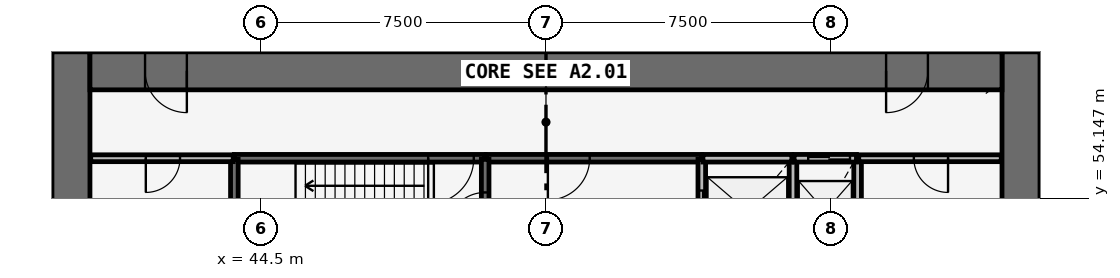
"""IFC4 building model, lengths in metres.
Left out: names, types, materials, properties, quantities, classifications, styles, units other than length and angle.
Written with IfcOpenShell. Run it as: python <this file> out.ifc"""

import sys

from ifc_helpers import new_model, si_unit, direction, frame, frame_2d, origin, place, context, subcontext, project, spatial, rectangle, extrude, source, transform, mapped, element, fill, save


model = new_model("IFC4")
c1 = context("Model", 3, precision=1e-05, world=origin(), true_north=direction((0.0, 1.0)))
c2 = subcontext(c1, "Body", "Model", "MODEL_VIEW")
j1 = project(units=[si_unit("LENGTHUNIT", "METRE"), si_unit("PLANEANGLEUNIT", "RADIAN")], contexts=[c1])
p1 = place(None, origin())
s1 = spatial("IfcSite", under=j1, at=p1, CompositionType="ELEMENT")
p2 = place(p1, origin())
s2 = spatial("IfcBuilding", under=s1, at=p2, CompositionType="ELEMENT")
p3 = place(p2, origin())
s3 = spatial("IfcBuildingStorey", under=s2, at=p3, CompositionType="ELEMENT", Elevation=0.0)
p4 = place(p3, frame((64.5, 38.0, -0.35), z_axis=(0.0, 0.0, 1.0), x_axis=(0.0, 1.0, 0.0)))
e1 = element("IfcWall", 1, at=p4, inside=s3, PredefinedType="SHEAR", context=c2, shape_type="SweptSolid", body=[
    extrude(rectangle(XDim=20.0, YDim=1.0, at=frame_2d((10.0, 0.0))), origin(), (0.0, 0.0, 1.0), 5.35),
])
p5 = place(p4, frame((9.1, 0.0, 0.35)))
e2 = element("IfcOpeningElement", 2, at=p5, cuts=e1, PredefinedType="OPENING", context=c2, shape_type="SweptSolid", body=[
    extrude(rectangle(XDim=1.8, YDim=2.1, at=frame_2d((0.9, 1.05))), frame((0.0, 0.51, 0.0), z_axis=(0.0, -1.0, 0.0), x_axis=(1.0, 0.0, 0.0)), (0.0, 0.0, 1.0), 1.02),
])
p6 = place(p3, frame((39.5, 58.0, -0.35), z_axis=(0.0, 0.0, 1.0), x_axis=(0.0, -1.0, 0.0)))
e3 = element("IfcWall", 3, at=p6, inside=s3, PredefinedType="SHEAR", context=c2, shape_type="SweptSolid", body=[
    extrude(rectangle(XDim=20.0, YDim=1.0, at=frame_2d((10.0, 0.0))), origin(), (0.0, 0.0, 1.0), 5.35),
])
p7 = place(p6, frame((9.1, 0.0, 0.35)))
e4 = element("IfcOpeningElement", 4, at=p7, cuts=e3, PredefinedType="OPENING", context=c2, shape_type="SweptSolid", body=[
    extrude(rectangle(XDim=1.8, YDim=2.1, at=frame_2d((0.9, 1.05))), frame((0.0, 0.51, 0.0), z_axis=(0.0, -1.0, 0.0), x_axis=(1.0, 0.0, 0.0)), (0.0, 0.0, 1.0), 1.02),
])
p8 = place(p3, frame((64.0, 57.5, -0.35), z_axis=(0.0, 0.0, 1.0), x_axis=(-1.0, 0.0, 0.0)))
e5 = element("IfcWall", 5, at=p8, inside=s3, PredefinedType="SHEAR", context=c2, shape_type="SweptSolid", body=[
    extrude(rectangle(XDim=24.0, YDim=1.0, at=frame_2d((12.0, 0.0))), origin(), (0.0, 0.0, 1.0), 5.35),
])
p9 = place(p8, frame((21.45, 0.0, 0.35)))
e6 = element("IfcOpeningElement", 6, at=p9, cuts=e5, PredefinedType="OPENING", context=c2, shape_type="SweptSolid", body=[
    extrude(rectangle(XDim=1.1, YDim=2.1, at=frame_2d((0.55, 1.05))), frame((0.0, 0.51, 0.0), z_axis=(0.0, -1.0, 0.0), x_axis=(1.0, 0.0, 0.0)), (0.0, 0.0, 1.0), 1.02),
])
p10 = place(p8, frame((1.95, 0.0, 0.35)))
e7 = element("IfcOpeningElement", 7, at=p10, cuts=e5, PredefinedType="OPENING", context=c2, shape_type="SweptSolid", body=[
    extrude(rectangle(XDim=1.1, YDim=2.1, at=frame_2d((0.55, 1.05))), frame((0.0, 0.51, 0.0), z_axis=(0.0, -1.0, 0.0), x_axis=(1.0, 0.0, 0.0)), (0.0, 0.0, 1.0), 1.02),
])
p11 = place(p3, frame((50.4, 55.2, 0.0), z_axis=(0.0, 0.0, 1.0), x_axis=(-1.0, 0.0, 0.0)))
e8 = element("IfcWall", 8, at=p11, inside=s3, PredefinedType="SOLIDWALL", context=c2, shape_type="SweptSolid", body=[
    extrude(rectangle(XDim=6.6, YDim=0.2, at=frame_2d((3.3, 0.0))), origin(), (0.0, 0.0, 1.0), 4.65),
])
p12 = place(p11, frame((0.3, 0.0, 0.0)))
e9 = element("IfcOpeningElement", 9, at=p12, cuts=e8, PredefinedType="OPENING", context=c2, shape_type="SweptSolid", body=[
    extrude(rectangle(XDim=1.2, YDim=2.1, at=frame_2d((0.6, 1.05))), frame((0.0, 0.11, 0.0), z_axis=(0.0, -1.0, 0.0), x_axis=(1.0, 0.0, 0.0)), (0.0, 0.0, 1.0), 0.22),
])
p13 = place(p3, frame((56.1, 55.2, 0.0), z_axis=(0.0, 0.0, 1.0), x_axis=(-1.0, 0.0, 0.0)))
e10 = element("IfcWall", 10, at=p13, inside=s3, PredefinedType="SOLIDWALL", context=c2, shape_type="SweptSolid", body=[
    extrude(rectangle(XDim=5.67, YDim=0.2, at=frame_2d((2.835, 0.0))), origin(), (0.0, 0.0, 1.0), 4.65),
])
p14 = place(p13, frame((2.95, 0.0, 0.0)))
e11 = element("IfcOpeningElement", 11, at=p14, cuts=e10, PredefinedType="OPENING", context=c2, shape_type="SweptSolid", body=[
    extrude(rectangle(XDim=1.1, YDim=2.1, at=frame_2d((0.55, 1.05))), frame((0.0, 0.11, 0.0), z_axis=(0.0, -1.0, 0.0), x_axis=(1.0, 0.0, 0.0)), (0.0, 0.0, 1.0), 0.22),
])
p15 = place(p3, frame((50.4, 52.4, 0.0), z_axis=(0.0, 0.0, 1.0), x_axis=(0.0, 1.0, 0.0)))
e12 = element("IfcWall", 12, at=p15, inside=s3, PredefinedType="SOLIDWALL", context=c2, shape_type="SweptSolid", body=[
    extrude(rectangle(XDim=2.77, YDim=0.2, at=frame_2d((1.385, 0.0))), origin(), (0.0, 0.0, 1.0), 4.65),
])
p16 = place(p15, frame((0.9, 0.0, 0.0)))
e13 = element("IfcOpeningElement", 13, at=p16, cuts=e12, PredefinedType="OPENING", context=c2, shape_type="SweptSolid", body=[
    extrude(rectangle(XDim=1.0, YDim=2.1, at=frame_2d((0.5, 1.05))), frame((0.0, 0.11, 0.0), z_axis=(0.0, -1.0, 0.0), x_axis=(1.0, 0.0, 0.0)), (0.0, 0.0, 1.0), 0.22),
])
p17 = place(p3, frame((56.1, 55.17, 0.0), z_axis=(0.0, 0.0, 1.0), x_axis=(0.0, -1.0, 0.0)))
e14 = element("IfcWall", 14, at=p17, inside=s3, PredefinedType="SOLIDWALL", context=c2, shape_type="SweptSolid", body=[
    extrude(rectangle(XDim=2.77, YDim=0.2, at=frame_2d((1.385, 0.0))), origin(), (0.0, 0.0, 1.0), 4.65),
])
p18 = place(p17, frame((0.82, 0.0, 0.0)))
e15 = element("IfcOpeningElement", 15, at=p18, cuts=e14, PredefinedType="OPENING", context=c2, shape_type="SweptSolid", body=[
    extrude(rectangle(XDim=1.1, YDim=2.1, at=frame_2d((0.55, 1.05))), frame((0.0, 0.11, 0.0), z_axis=(0.0, -1.0, 0.0), x_axis=(1.0, 0.0, 0.0)), (0.0, 0.0, 1.0), 0.22),
])
for number, where, z_axis, x_axis in (
    (16, (58.5, 52.4, 0.0), (0.0, 0.0, 1.0), (0.0, 1.0, 0.0)),
    (17, (60.2, 52.4, 0.0), (0.0, 0.0, 1.0), (0.0, 1.0, 0.0)),
):
    element("IfcWall", number, at=place(p3, frame(where, z_axis=z_axis, x_axis=x_axis)), inside=s3, PredefinedType="SOLIDWALL", context=c2, shape_type="SweptSolid", body=[
        extrude(rectangle(XDim=2.8, YDim=0.2, at=frame_2d((1.4, 0.0))), origin(), (0.0, 0.0, 1.0), 4.65),
    ])
p19 = place(p3, frame((58.47, 55.2, 0.0), z_axis=(0.0, 0.0, 1.0), x_axis=(-1.0, 0.0, 0.0)))
e18 = element("IfcWall", 18, at=p19, inside=s3, PredefinedType="SOLIDWALL", context=c2, shape_type="SweptSolid", body=[
    extrude(rectangle(XDim=2.34, YDim=0.2, at=frame_2d((1.17, 0.0))), origin(), (0.0, 0.0, 1.0), 4.65),
])
p20 = place(p3, frame((43.8, 55.17, 0.0), z_axis=(0.0, 0.0, 1.0), x_axis=(0.0, -1.0, 0.0)))
e19 = element("IfcWall", 19, at=p20, inside=s3, PredefinedType="SOLIDWALL", context=c2, shape_type="SweptSolid", body=[
    extrude(rectangle(XDim=2.14, YDim=0.2, at=frame_2d((1.07, 0.0))), origin(), (0.0, 0.0, 1.0), 4.65),
])
p21 = place(p3, frame((60.17, 55.2, 0.0), z_axis=(0.0, 0.0, 1.0), x_axis=(-1.0, 0.0, 0.0)))
e20 = element("IfcWall", 20, at=p21, inside=s3, PredefinedType="SOLIDWALL", context=c2, shape_type="SweptSolid", body=[
    extrude(rectangle(XDim=1.64, YDim=0.2, at=frame_2d((0.82, 0.0))), origin(), (0.0, 0.0, 1.0), 4.65),
])
p22 = place(p21, frame((0.17, 0.0, 0.0)))
e21 = element("IfcOpeningElement", 21, at=p22, cuts=e20, PredefinedType="OPENING", context=c2, shape_type="SweptSolid", body=[
    extrude(rectangle(XDim=1.1, YDim=2.1, at=frame_2d((0.55, 1.05))), frame((0.0, 0.11, 0.0), z_axis=(0.0, -1.0, 0.0), x_axis=(1.0, 0.0, 0.0)), (0.0, 0.0, 1.0), 0.22),
])
p23 = place(p3, frame((43.77, 55.2, 0.0), z_axis=(0.0, 0.0, 1.0), x_axis=(-1.0, 0.0, 0.0)))
e22 = element("IfcWall", 22, at=p23, inside=s3, PredefinedType="PARTITIONING", context=c2, shape_type="SweptSolid", body=[
    extrude(rectangle(XDim=3.75, YDim=0.18, at=frame_2d((1.875, 0.0))), origin(), (0.0, 0.0, 1.0), 4.65),
])
p24 = place(p23, frame((1.4, 0.0, 0.0)))
e23 = element("IfcOpeningElement", 23, at=p24, cuts=e22, PredefinedType="OPENING", context=c2, shape_type="SweptSolid", body=[
    extrude(rectangle(XDim=0.9, YDim=2.1, at=frame_2d((0.45, 1.05))), frame((0.0, 0.1, 0.0), z_axis=(0.0, -1.0, 0.0), x_axis=(1.0, 0.0, 0.0)), (0.0, 0.0, 1.0), 0.2),
])
p25 = place(p3, frame((63.98, 55.2, 0.0), z_axis=(0.0, 0.0, 1.0), x_axis=(-1.0, 0.0, 0.0)))
e24 = element("IfcWall", 24, at=p25, inside=s3, PredefinedType="PARTITIONING", context=c2, shape_type="SweptSolid", body=[
    extrude(rectangle(XDim=3.75, YDim=0.18, at=frame_2d((1.875, 0.0))), origin(), (0.0, 0.0, 1.0), 4.65),
])
p26 = place(p25, frame((1.4, 0.0, 0.0)))
e25 = element("IfcOpeningElement", 25, at=p26, cuts=e24, PredefinedType="OPENING", context=c2, shape_type="SweptSolid", body=[
    extrude(rectangle(XDim=0.9, YDim=2.1, at=frame_2d((0.45, 1.05))), frame((0.0, 0.1, 0.0), z_axis=(0.0, -1.0, 0.0), x_axis=(1.0, 0.0, 0.0)), (0.0, 0.0, 1.0), 0.2),
])
m1 = source(origin(), c2, "Body", "SweptSolid", [
    extrude(rectangle(XDim=1.1, YDim=2.1, at=frame_2d((0.55, 1.05))), frame((0.0, 0.025, 0.0), z_axis=(0.0, -1.0, 0.0), x_axis=(1.0, 0.0, 0.0)), (0.0, 0.0, 1.0), 0.05),
])
p27 = place(p18, origin())
e26 = element("IfcDoor", 26, at=p27, inside=s3, OperationType="DOUBLE_DOOR_SLIDING", PredefinedType="USERDEFINED", context=c2, shape_type="MappedRepresentation", body=[
    mapped(m1, transform((0.0, 0.0, 0.0), scale=1.0)),
])
fill(e15, e26)
p28 = place(p22, origin())
e27 = element("IfcDoor", 27, at=p28, inside=s3, OperationType="DOUBLE_DOOR_SLIDING", PredefinedType="USERDEFINED", context=c2, shape_type="MappedRepresentation", body=[
    mapped(m1, transform((0.0, 0.0, 0.0), scale=1.0)),
])
fill(e21, e27)
m2 = source(origin(), c2, "Body", "SweptSolid", [
    extrude(rectangle(XDim=1.2, YDim=2.1, at=frame_2d((0.6, 1.05))), frame((0.0, 0.025, 0.0), z_axis=(0.0, -1.0, 0.0), x_axis=(1.0, 0.0, 0.0)), (0.0, 0.0, 1.0), 0.05),
])
p29 = place(p12, origin())
e28 = element("IfcDoor", 28, at=p29, inside=s3, OperationType="SINGLE_SWING_RIGHT", PredefinedType="DOOR", context=c2, shape_type="MappedRepresentation", body=[
    mapped(m2, transform((0.0, 0.0, 0.0), scale=1.0)),
])
fill(e9, e28)
m3 = source(origin(), c2, "Body", "SweptSolid", [
    extrude(rectangle(XDim=1.0, YDim=2.1, at=frame_2d((0.5, 1.05))), frame((0.0, 0.025, 0.0), z_axis=(0.0, -1.0, 0.0), x_axis=(1.0, 0.0, 0.0)), (0.0, 0.0, 1.0), 0.05),
])
p30 = place(p16, origin())
e29 = element("IfcDoor", 29, at=p30, inside=s3, OperationType="SINGLE_SWING_LEFT", PredefinedType="DOOR", context=c2, shape_type="MappedRepresentation", body=[
    mapped(m3, transform((0.0, 0.0, 0.0), scale=1.0)),
])
fill(e13, e29)
m4 = source(origin(), c2, "Body", "SweptSolid", [
    extrude(rectangle(XDim=1.1, YDim=2.1, at=frame_2d((0.55, 1.05))), frame((0.0, 0.025, 0.0), z_axis=(0.0, -1.0, 0.0), x_axis=(1.0, 0.0, 0.0)), (0.0, 0.0, 1.0), 0.05),
])
p31 = place(p14, origin())
e30 = element("IfcDoor", 30, at=p31, inside=s3, OperationType="SINGLE_SWING_RIGHT", PredefinedType="DOOR", context=c2, shape_type="MappedRepresentation", body=[
    mapped(m4, transform((0.0, 0.0, 0.0), scale=1.0)),
])
fill(e11, e30)
m5 = source(origin(), c2, "Body", "SweptSolid", [
    extrude(rectangle(XDim=1.1, YDim=2.1, at=frame_2d((0.55, 1.05))), frame((0.0, 0.025, 0.0), z_axis=(0.0, -1.0, 0.0), x_axis=(1.0, 0.0, 0.0)), (0.0, 0.0, 1.0), 0.05),
])
p32 = place(p9, origin())
e31 = element("IfcDoor", 31, at=p32, inside=s3, OperationType="SINGLE_SWING_LEFT", PredefinedType="DOOR", context=c2, shape_type="MappedRepresentation", body=[
    mapped(m5, transform((0.0, 0.0, 0.0), scale=1.0)),
])
fill(e6, e31)
p33 = place(p10, origin())
e32 = element("IfcDoor", 32, at=p33, inside=s3, OperationType="SINGLE_SWING_RIGHT", PredefinedType="DOOR", context=c2, shape_type="MappedRepresentation", body=[
    mapped(m5, transform((0.0, 0.0, 0.0), scale=1.0)),
])
fill(e7, e32)
m6 = source(origin(), c2, "Body", "SweptSolid", [
    extrude(rectangle(XDim=0.9, YDim=2.1, at=frame_2d((0.45, 1.05))), frame((0.0, 0.025, 0.0), z_axis=(0.0, -1.0, 0.0), x_axis=(1.0, 0.0, 0.0)), (0.0, 0.0, 1.0), 0.05),
])
p34 = place(p24, origin())
e33 = element("IfcDoor", 33, at=p34, inside=s3, OperationType="SINGLE_SWING_RIGHT", PredefinedType="DOOR", context=c2, shape_type="MappedRepresentation", body=[
    mapped(m6, transform((0.0, 0.0, 0.0), scale=1.0)),
])
fill(e23, e33)
p35 = place(p26, origin())
e34 = element("IfcDoor", 34, at=p35, inside=s3, OperationType="SINGLE_SWING_LEFT", PredefinedType="DOOR", context=c2, shape_type="MappedRepresentation", body=[
    mapped(m6, transform((0.0, 0.0, 0.0), scale=1.0)),
])
fill(e25, e34)
save(model, sys.argv[1])
